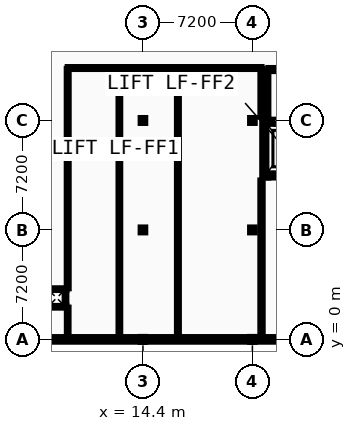
"""IFC4 building model, lengths in metres.
Left out: names, types, materials, properties, quantities, classifications, styles, units other than length and angle.
Written with IfcOpenShell. Run it as: python <this file> out.ifc"""

import sys

from ifc_helpers import new_model, si_unit, direction, frame, frame_2d, origin, origin_2d, place, context, subcontext, project, spatial, rectangle, i_section, extrude, element, fill, save


model = new_model("IFC4")
c1 = context("Model", 3, precision=1e-05, world=origin(), true_north=direction((0.0, 1.0)))
c2 = subcontext(c1, "Body", "Model", "MODEL_VIEW")
j1 = project(units=[si_unit("LENGTHUNIT", "METRE"), si_unit("PLANEANGLEUNIT", "RADIAN")], contexts=[c1])
p1 = place(None, origin())
s1 = spatial("IfcSite", under=j1, at=p1, CompositionType="ELEMENT")
p2 = place(p1, origin())
s2 = spatial("IfcBuilding", under=s1, at=p2, CompositionType="ELEMENT")
p3 = place(p2, frame((0.0, 0.0, 22.8)))
s3 = spatial("IfcBuildingStorey", under=s2, at=p3, CompositionType="ELEMENT", Elevation=22.8)
for number, where, z_axis, x_axis in (
    (1, (14.4, 0.0, 0.0), (0.0, 0.0, 1.0), (1.0, 0.0, 0.0)),
    (2, (14.4, 7.2, 0.0), (0.0, 0.0, 1.0), (1.0, 0.0, 0.0)),
    (3, (14.4, 14.4, 0.0), (0.0, 0.0, 1.0), (1.0, 0.0, 0.0)),
    (4, (21.6, 0.0, 0.0), (0.0, 0.0, 1.0), (1.0, 0.0, 0.0)),
    (5, (21.6, 7.2, 0.0), (0.0, 0.0, 1.0), (1.0, 0.0, 0.0)),
    (6, (21.6, 14.4, 0.0), (0.0, 0.0, 1.0), (1.0, 0.0, 0.0)),
):
    element("IfcColumn", number, at=place(p3, frame(where, z_axis=z_axis, x_axis=x_axis)), inside=s3, PredefinedType="COLUMN", context=c2, shape_type="SweptSolid", body=[
        extrude(i_section(OverallWidth=0.3, OverallDepth=0.32, WebThickness=0.011, FlangeThickness=0.021, FilletRadius=0.027, at=origin_2d()), origin(), (0.0, 0.0, 1.0), 4.4),
    ])
p4 = place(p3, frame((7.2, 0.0, 0.0), z_axis=(0.0, 0.0, 1.0), x_axis=(1.0, 0.0, 0.0)))
e7 = element("IfcWall", 7, at=p4, inside=s3, PredefinedType="STANDARD", context=c2, shape_type="SweptSolid", body=[
    extrude(rectangle(XDim=7.2, YDim=0.3, at=frame_2d((3.6, 0.0))), origin(), (0.0, 0.0, 1.0), 3.95),
])
p5 = place(p3, frame((14.4, 0.0, 0.0), z_axis=(0.0, 0.0, 1.0), x_axis=(1.0, 0.0, 0.0)))
e8 = element("IfcWall", 8, at=p5, inside=s3, PredefinedType="STANDARD", context=c2, shape_type="SweptSolid", body=[
    extrude(rectangle(XDim=7.2, YDim=0.3, at=frame_2d((3.6, 0.0))), origin(), (0.0, 0.0, 1.0), 3.95),
])
p6 = place(p3, frame((21.6, 0.0, 0.0), z_axis=(0.0, 0.0, 1.0), x_axis=(1.0, 0.0, 0.0)))
e9 = element("IfcWall", 9, at=p6, inside=s3, PredefinedType="STANDARD", context=c2, shape_type="SweptSolid", body=[
    extrude(rectangle(XDim=7.05, YDim=0.3, at=frame_2d((3.525, 0.0))), origin(), (0.0, 0.0, 1.0), 3.95),
])
p7 = place(p6, frame((1.481, 0.0, 0.95)))
e10 = element("IfcOpeningElement", 10, at=p7, cuts=e9, PredefinedType="OPENING", context=c2, shape_type="SweptSolid", body=[
    extrude(rectangle(XDim=1.268, YDim=1.404, at=frame_2d((0.634, 0.702))), frame((0.0, 0.16, 0.0), z_axis=(0.0, -1.0, 0.0), x_axis=(1.0, 0.0, 0.0)), (0.0, 0.0, 1.0), 0.32),
])
p8 = place(p6, frame((4.301, 0.0, 0.95)))
e11 = element("IfcOpeningElement", 11, at=p8, cuts=e9, PredefinedType="OPENING", context=c2, shape_type="SweptSolid", body=[
    extrude(rectangle(XDim=1.268, YDim=1.404, at=frame_2d((0.634, 0.702))), frame((0.0, 0.16, 0.0), z_axis=(0.0, -1.0, 0.0), x_axis=(1.0, 0.0, 0.0)), (0.0, 0.0, 1.0), 0.32),
])
p9 = place(p3, frame((22.65, 10.85, 0.0), z_axis=(0.0, 0.0, 1.0), x_axis=(1.0, 0.0, 0.0)))
e12 = element("IfcWall", 12, at=p9, inside=s3, PredefinedType="SHEAR", context=c2, shape_type="SweptSolid", body=[
    extrude(rectangle(XDim=2.2, YDim=0.4, at=frame_2d((1.1, 0.0))), origin(), (0.0, 0.0, 1.0), 4.215),
])
p10 = place(p3, frame((22.65, 14.25, 0.0), z_axis=(0.0, 0.0, 1.0), x_axis=(1.0, 0.0, 0.0)))
e13 = element("IfcWall", 13, at=p10, inside=s3, PredefinedType="SHEAR", context=c2, shape_type="SweptSolid", body=[
    extrude(rectangle(XDim=2.2, YDim=0.4, at=frame_2d((1.1, 0.0))), origin(), (0.0, 0.0, 1.0), 4.215),
])
p11 = place(p10, frame((0.4, 0.0, 0.0)))
e14 = element("IfcOpeningElement", 14, at=p11, cuts=e13, PredefinedType="OPENING", context=c2, shape_type="SweptSolid", body=[
    extrude(rectangle(XDim=1.4, YDim=2.2, at=frame_2d((0.7, 1.1))), frame((0.0, 0.21, 0.0), z_axis=(0.0, -1.0, 0.0), x_axis=(1.0, 0.0, 0.0)), (0.0, 0.0, 1.0), 0.42),
])
p12 = place(p3, frame((22.45, 10.65, 0.0), z_axis=(0.0, 0.0, 1.0), x_axis=(0.0, 1.0, 0.0)))
e15 = element("IfcWall", 15, at=p12, inside=s3, PredefinedType="SHEAR", context=c2, shape_type="SweptSolid", body=[
    extrude(rectangle(XDim=3.8, YDim=0.4, at=frame_2d((1.9, 0.0))), origin(), (0.0, 0.0, 1.0), 4.215),
])
p13 = place(p3, frame((22.65, 17.75, 0.0), z_axis=(0.0, 0.0, 1.0), x_axis=(1.0, 0.0, 0.0)))
e16 = element("IfcWall", 16, at=p13, inside=s3, PredefinedType="PARTITIONING", context=c2, shape_type="SweptSolid", body=[
    extrude(rectangle(XDim=5.75, YDim=0.2, at=frame_2d((2.875, 0.0))), origin(), (0.0, 0.0, 1.0), 4.215),
])
p14 = place(p13, frame((2.075, 0.0, 0.0)))
e17 = element("IfcOpeningElement", 17, at=p14, cuts=e16, PredefinedType="OPENING", context=c2, shape_type="SweptSolid", body=[
    extrude(rectangle(XDim=1.6, YDim=2.2, at=frame_2d((0.8, 1.1))), frame((0.0, 0.11, 0.0), z_axis=(0.0, -1.0, 0.0), x_axis=(1.0, 0.0, 0.0)), (0.0, 0.0, 1.0), 0.22),
])
p15 = place(p3, frame((22.55, 14.45, 0.0), z_axis=(0.0, 0.0, 1.0), x_axis=(0.0, 1.0, 0.0)))
e18 = element("IfcWall", 18, at=p15, inside=s3, PredefinedType="PARTITIONING", context=c2, shape_type="SweptSolid", body=[
    extrude(rectangle(XDim=3.2, YDim=0.2, at=frame_2d((1.6, 0.0))), origin(), (0.0, 0.0, 1.0), 4.215),
])
for number, where, z_axis, x_axis in (
    (19, (8.09, 2.145, 0.0), (0.0, 0.0, 1.0), (1.0, 0.0, 0.0)),
    (20, (8.09, 3.305, 0.0), (0.0, 0.0, 1.0), (1.0, 0.0, 0.0)),
):
    element("IfcWall", number, at=place(p3, frame(where, z_axis=z_axis, x_axis=x_axis)), inside=s3, PredefinedType="PARTITIONING", context=c2, shape_type="SweptSolid", body=[
        extrude(rectangle(XDim=1.27, YDim=0.11, at=frame_2d((0.635, 0.0))), origin(), (0.0, 0.0, 1.0), 4.215),
    ])
p16 = place(p3, frame((9.305, 2.2, 0.0), z_axis=(0.0, 0.0, 1.0), x_axis=(0.0, 1.0, 0.0)))
e21 = element("IfcWall", 21, at=p16, inside=s3, PredefinedType="PARTITIONING", context=c2, shape_type="SweptSolid", body=[
    extrude(rectangle(XDim=1.05, YDim=0.11, at=frame_2d((0.525, 0.0))), origin(), (0.0, 0.0, 1.0), 4.215),
])
p17 = place(p3, frame((9.45, 17.85, 0.0), z_axis=(0.0, 0.0, 1.0), x_axis=(1.0, 0.0, 0.0)))
e22 = element("IfcWall", 22, at=p17, inside=s3, PredefinedType="PARTITIONING", context=c2, shape_type="SweptSolid", body=[
    extrude(rectangle(XDim=12.75, YDim=0.125, at=frame_2d((6.375, 0.0))), origin(), (0.0, 0.0, 1.0), 4.215),
])
p18 = place(p17, frame((1.2, 0.0, 0.0)))
e23 = element("IfcOpeningElement", 23, at=p18, cuts=e22, PredefinedType="OPENING", context=c2, shape_type="SweptSolid", body=[
    extrude(rectangle(XDim=1.0, YDim=2.1, at=frame_2d((0.5, 1.05))), frame((0.0, 0.073, 0.0), z_axis=(0.0, -1.0, 0.0), x_axis=(1.0, 0.0, 0.0)), (0.0, 0.0, 1.0), 0.145),
])
p19 = place(p17, frame((5.9, 0.0, 0.0)))
e24 = element("IfcOpeningElement", 24, at=p19, cuts=e22, PredefinedType="OPENING", context=c2, shape_type="SweptSolid", body=[
    extrude(rectangle(XDim=0.9, YDim=2.1, at=frame_2d((0.45, 1.05))), frame((0.0, 0.073, 0.0), z_axis=(0.0, -1.0, 0.0), x_axis=(1.0, 0.0, 0.0)), (0.0, 0.0, 1.0), 0.145),
])
p20 = place(p17, frame((7.7, 0.0, 0.0)))
e25 = element("IfcOpeningElement", 25, at=p20, cuts=e22, PredefinedType="OPENING", context=c2, shape_type="SweptSolid", body=[
    extrude(rectangle(XDim=1.5, YDim=2.2, at=frame_2d((0.75, 1.1))), frame((0.0, 0.073, 0.0), z_axis=(0.0, -1.0, 0.0), x_axis=(1.0, 0.0, 0.0)), (0.0, 0.0, 1.0), 0.145),
])
p21 = place(p3, frame((9.45, 0.2, 0.0), z_axis=(0.0, 0.0, 1.0), x_axis=(0.0, 1.0, 0.0)))
e26 = element("IfcWall", 26, at=p21, inside=s3, PredefinedType="PARTITIONING", context=c2, shape_type="SweptSolid", body=[
    extrude(rectangle(XDim=1.89, YDim=0.11, at=frame_2d((0.945, 0.0))), origin(), (0.0, 0.0, 1.0), 4.0),
])
p22 = place(p3, frame((9.45, 3.36, 0.0), z_axis=(0.0, 0.0, 1.0), x_axis=(0.0, 1.0, 0.0)))
e27 = element("IfcWall", 27, at=p22, inside=s3, PredefinedType="PARTITIONING", context=c2, shape_type="SweptSolid", body=[
    extrude(rectangle(XDim=14.427, YDim=0.125, at=frame_2d((7.214, 0.0))), origin(), (0.0, 0.0, 1.0), 4.0),
])
p23 = place(p3, frame((12.85, 0.2, 0.0), z_axis=(0.0, 0.0, 1.0), x_axis=(0.0, 1.0, 0.0)))
e28 = element("IfcWall", 28, at=p23, inside=s3, PredefinedType="PARTITIONING", context=c2, shape_type="SweptSolid", body=[
    extrude(rectangle(XDim=17.588, YDim=0.11, at=frame_2d((8.794, 0.0))), origin(), (0.0, 0.0, 1.0), 4.215),
])
p24 = place(p3, frame((16.7, 0.2, 0.0), z_axis=(0.0, 0.0, 1.0), x_axis=(0.0, 1.0, 0.0)))
e29 = element("IfcWall", 29, at=p24, inside=s3, PredefinedType="PARTITIONING", context=c2, shape_type="SweptSolid", body=[
    extrude(rectangle(XDim=17.588, YDim=0.125, at=frame_2d((8.794, 0.0))), origin(), (0.0, 0.0, 1.0), 4.0),
])
p25 = place(p3, frame((22.2, 0.2, 0.0), z_axis=(0.0, 0.0, 1.0), x_axis=(0.0, 1.0, 0.0)))
e30 = element("IfcWall", 30, at=p25, inside=s3, PredefinedType="PARTITIONING", context=c2, shape_type="SweptSolid", body=[
    extrude(rectangle(XDim=10.25, YDim=0.15, at=frame_2d((5.125, 0.0))), origin(), (0.0, 0.0, 1.0), 4.215),
])
p26 = place(p3, frame((22.2, 14.65, 0.0), z_axis=(0.0, 0.0, 1.0), x_axis=(0.0, 1.0, 0.0)))
e31 = element("IfcWall", 31, at=p26, inside=s3, PredefinedType="PARTITIONING", context=c2, shape_type="SweptSolid", body=[
    extrude(rectangle(XDim=3.138, YDim=0.142, at=frame_2d((1.569, 0.0))), origin(), (0.0, 0.0, 1.0), 4.215),
])
p27 = place(p7, origin())
e32 = element("IfcWindow", 32, at=p27, inside=s3, PartitioningType="SINGLE_PANEL", PredefinedType="WINDOW", context=c2, shape_type="SweptSolid", body=[
    extrude(rectangle(XDim=1.268, YDim=1.404, at=frame_2d((0.634, 0.702))), frame((0.0, 0.03, 0.0), z_axis=(0.0, -1.0, 0.0), x_axis=(1.0, 0.0, 0.0)), (0.0, 0.0, 1.0), 0.06),
])
fill(e10, e32)
p28 = place(p11, origin())
e33 = element("IfcDoor", 33, at=p28, inside=s3, OperationType="SLIDING_TO_LEFT", PredefinedType="DOOR", context=c2, shape_type="SweptSolid", body=[
    extrude(rectangle(XDim=1.4, YDim=2.2, at=frame_2d((0.7, 1.1))), frame((0.0, 0.025, 0.0), z_axis=(0.0, -1.0, 0.0), x_axis=(1.0, 0.0, 0.0)), (0.0, 0.0, 1.0), 0.05),
])
fill(e14, e33)
p29 = place(p18, origin())
e34 = element("IfcDoor", 34, at=p29, inside=s3, OperationType="SLIDING_TO_LEFT", PredefinedType="DOOR", context=c2, shape_type="SweptSolid", body=[
    extrude(rectangle(XDim=1.0, YDim=2.1, at=frame_2d((0.5, 1.05))), frame((0.0, 0.025, 0.0), z_axis=(0.0, -1.0, 0.0), x_axis=(1.0, 0.0, 0.0)), (0.0, 0.0, 1.0), 0.05),
])
fill(e23, e34)
p30 = place(p19, origin())
e35 = element("IfcDoor", 35, at=p30, inside=s3, OperationType="SINGLE_SWING_RIGHT", PredefinedType="DOOR", context=c2, shape_type="SweptSolid", body=[
    extrude(rectangle(XDim=0.9, YDim=2.1, at=frame_2d((0.45, 1.05))), frame((0.0, 0.025, 0.0), z_axis=(0.0, -1.0, 0.0), x_axis=(1.0, 0.0, 0.0)), (0.0, 0.0, 1.0), 0.05),
])
fill(e24, e35)
p31 = place(p20, origin())
e36 = element("IfcDoor", 36, at=p31, inside=s3, OperationType="DOUBLE_DOOR_SINGLE_SWING", PredefinedType="DOOR", context=c2, shape_type="SweptSolid", body=[
    extrude(rectangle(XDim=1.5, YDim=2.2, at=frame_2d((0.75, 1.1))), frame((0.0, 0.025, 0.0), z_axis=(0.0, -1.0, 0.0), x_axis=(1.0, 0.0, 0.0)), (0.0, 0.0, 1.0), 0.05),
])
fill(e25, e36)
save(model, sys.argv[1])
